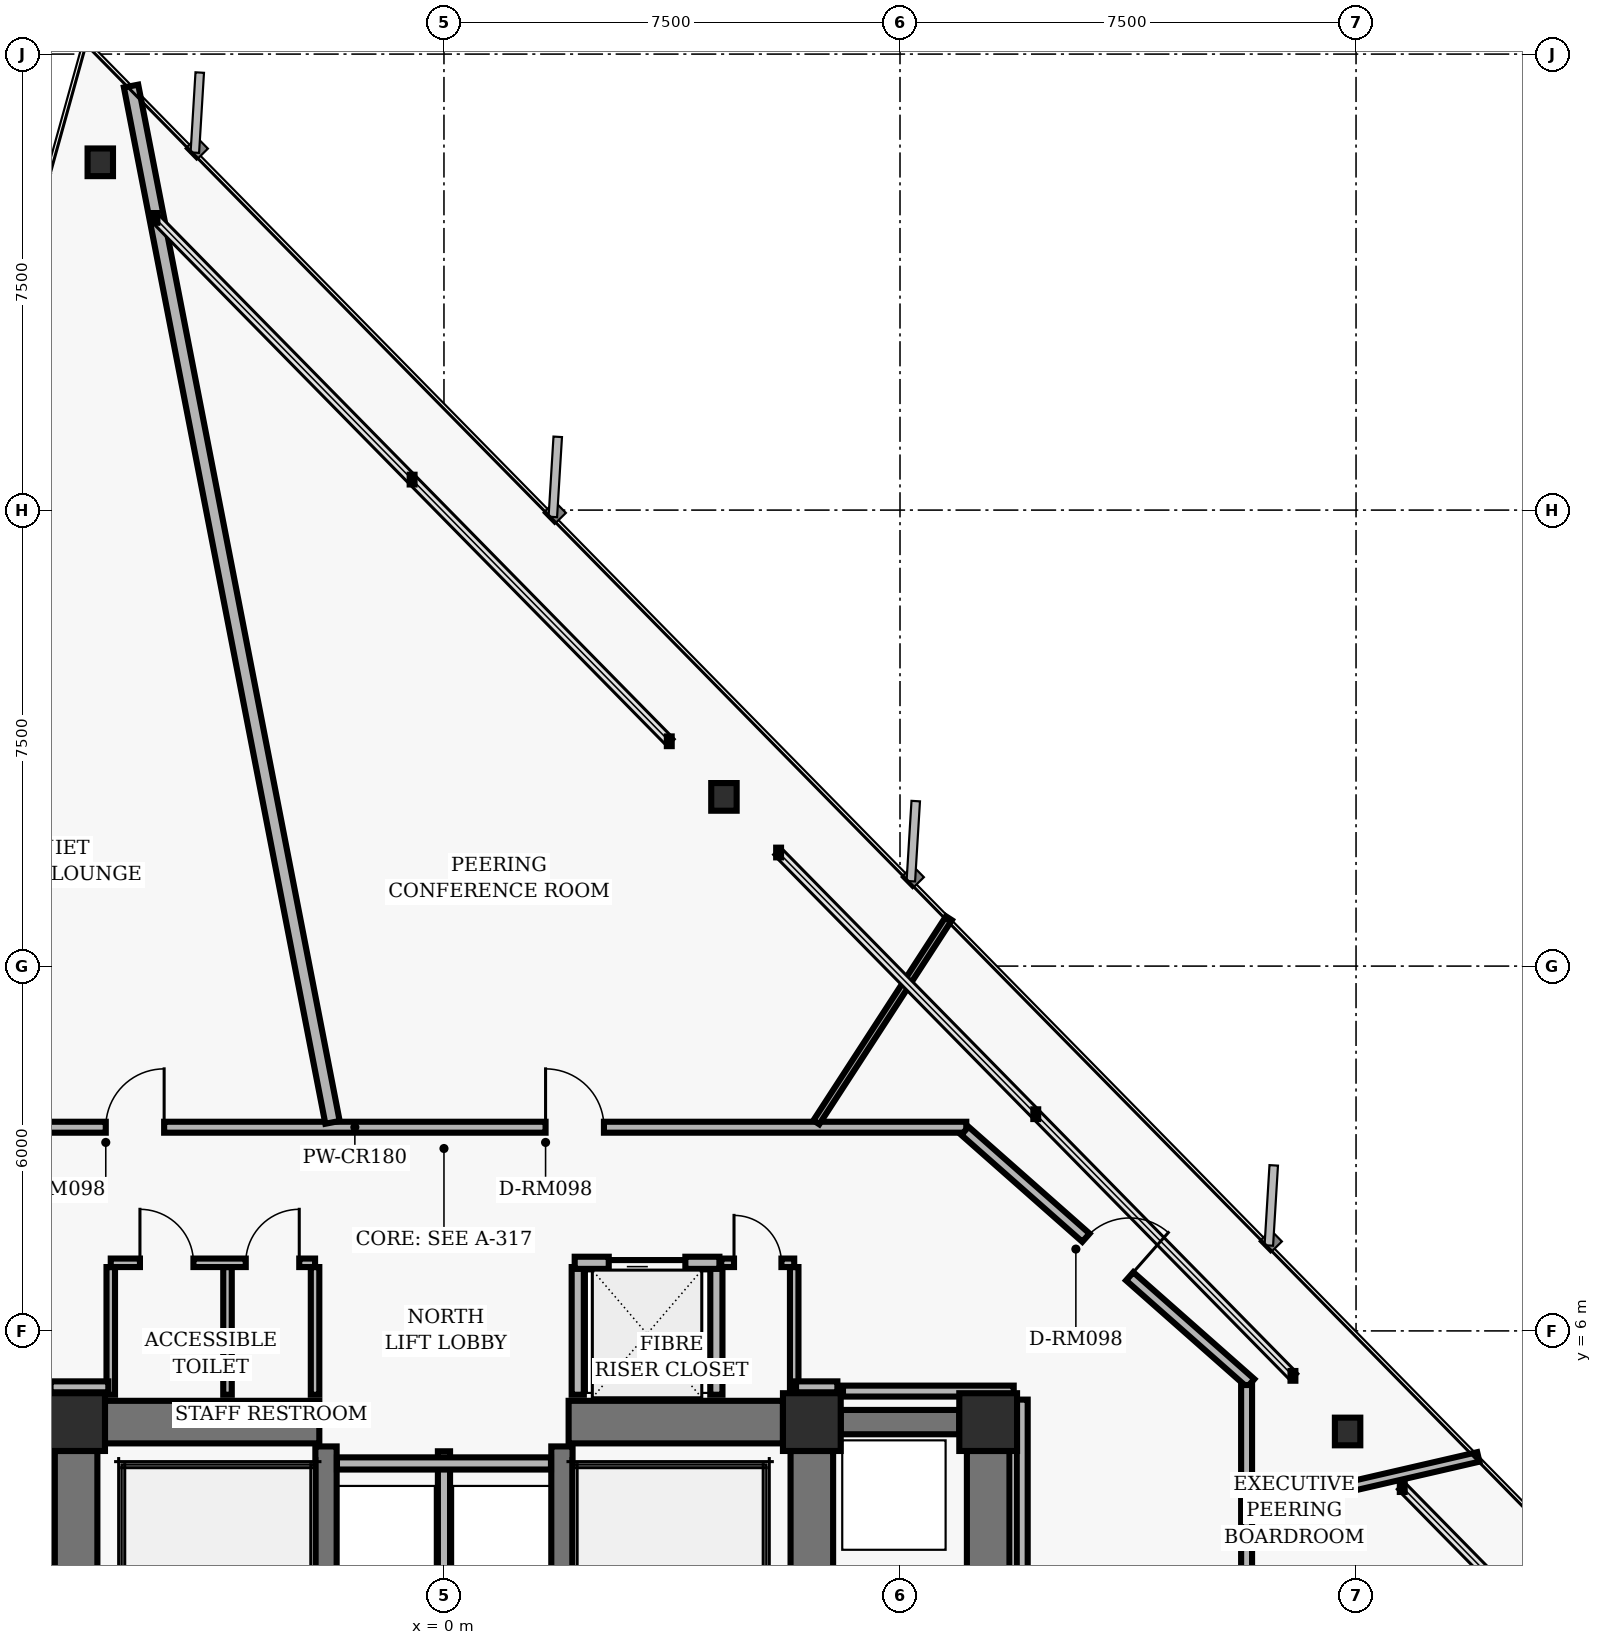
"""IFC4 building model, lengths in metres.
Left out: names, types, materials, properties, quantities, classifications, styles, units other than length and angle.
Written with IfcOpenShell. Run it as: python <this file> out.ifc"""

import sys

from ifc_helpers import new_model, si_unit, direction, frame, frame_2d, origin, origin_2d, place, context, subcontext, project, spatial, rectangle, hollow_rectangle, i_section, extrude, element, fill, save


model = new_model("IFC4")
c1 = context("Model", 3, precision=1e-05, world=origin(), true_north=direction((0.0, 1.0)))
c2 = subcontext(c1, "Body", "Model", "MODEL_VIEW")
j1 = project(units=[si_unit("LENGTHUNIT", "METRE"), si_unit("PLANEANGLEUNIT", "RADIAN")], contexts=[c1])
p1 = place(None, origin())
s1 = spatial("IfcSite", under=j1, at=p1, CompositionType="ELEMENT")
p2 = place(p1, origin())
s2 = spatial("IfcBuilding", under=s1, at=p2, CompositionType="ELEMENT")
p3 = place(p2, frame((0.0, 0.0, 79.52)))
s3 = spatial("IfcBuildingStorey", under=s2, at=p3, CompositionType="ELEMENT", Elevation=79.52)
for number, where, z_axis, x_axis in (
    (1, (-6.05, 4.5, 0.0), (0.0, 0.0, 1.0), (1.0, 0.0, 0.0)),
    (2, (6.05, 4.5, 0.0), (0.0, 0.0, 1.0), (1.0, 0.0, 0.0)),
    (3, (8.95, 4.5, 0.0), (0.0, 0.0, 1.0), (1.0, 0.0, 0.0)),
):
    element("IfcColumn", number, at=place(p3, frame(where, z_axis=z_axis, x_axis=x_axis)), inside=s3, PredefinedType="COLUMN", context=c2, shape_type="SweptSolid", body=[
        extrude(hollow_rectangle(XDim=0.95, YDim=0.95, WallThickness=0.06, InnerFilletRadius=0.02, OuterFilletRadius=0.04, at=origin_2d()), origin(), (0.0, 0.0, 1.0), 3.04),
    ])
for number, where, z_axis, x_axis in (
    (4, (-6.05, 0.475, 0.0), (0.0, 0.0, 1.0), (0.0, 1.0, 0.0)),
    (5, (6.05, 0.475, 0.0), (0.0, 0.0, 1.0), (0.0, 1.0, 0.0)),
):
    element("IfcWall", number, at=place(p3, frame(where, z_axis=z_axis, x_axis=x_axis)), inside=s3, PredefinedType="SHEAR", context=c2, shape_type="SweptSolid", body=[
        extrude(rectangle(XDim=3.55, YDim=0.7, at=frame_2d((1.775, 0.0))), origin(), (0.0, 0.0, 1.0), 2.788),
    ])
for number, where, z_axis, x_axis in (
    (6, (-1.94, -4.1, 0.0), (0.0, 0.0, 1.0), (0.0, 1.0, 0.0)),
    (7, (1.94, -4.1, 0.0), (0.0, 0.0, 1.0), (0.0, 1.0, 0.0)),
):
    element("IfcWall", number, at=place(p3, frame(where, z_axis=z_axis, x_axis=x_axis)), inside=s3, PredefinedType="SHEAR", context=c2, shape_type="SweptSolid", body=[
        extrude(rectangle(XDim=8.2, YDim=0.35, at=frame_2d((4.1, 0.0))), origin(), (0.0, 0.0, 1.0), 2.788),
    ])
for number, where, z_axis, x_axis in (
    (8, (-5.575, 4.5, 0.0), (0.0, 0.0, 1.0), (1.0, 0.0, 0.0)),
    (9, (2.05, 4.5, 0.0), (0.0, 0.0, 1.0), (1.0, 0.0, 0.0)),
):
    element("IfcWall", number, at=place(p3, frame(where, z_axis=z_axis, x_axis=x_axis)), inside=s3, PredefinedType="SHEAR", context=c2, shape_type="SweptSolid", body=[
        extrude(rectangle(XDim=3.525, YDim=0.7, at=frame_2d((1.762, 0.0))), origin(), (0.0, 0.0, 1.0), 2.788),
    ])
p4 = place(p3, frame((8.95, -3.825, 0.0), z_axis=(0.0, 0.0, 1.0), x_axis=(0.0, 1.0, 0.0)))
e10 = element("IfcWall", 10, at=p4, inside=s3, PredefinedType="SHEAR", context=c2, shape_type="SweptSolid", body=[
    extrude(rectangle(XDim=7.85, YDim=0.7, at=frame_2d((3.925, 0.0))), origin(), (0.0, 0.0, 1.0), 2.788),
])
p5 = place(p3, frame((6.525, 4.5, 0.0), z_axis=(0.0, 0.0, 1.0), x_axis=(1.0, 0.0, 0.0)))
e11 = element("IfcWall", 11, at=p5, inside=s3, PredefinedType="SHEAR", context=c2, shape_type="SweptSolid", body=[
    extrude(rectangle(XDim=1.95, YDim=0.4, at=frame_2d((0.975, 0.0))), origin(), (0.0, 0.0, 1.0), 2.788),
])
for number, where, z_axis, x_axis in (
    (12, (14.861, 4.346, 0.0), (0.0, 0.0, 1.0), (1.0, 0.0, 0.0)),
    (13, (4.604, 14.783, 0.0), (0.0, 0.0, 1.0), (1.0, 0.0, 0.0)),
    (14, (-5.652, 25.22, 0.0), (0.0, 0.0, 1.0), (1.0, 0.0, 0.0)),
):
    element("IfcColumn", number, at=place(p3, frame(where, z_axis=z_axis, x_axis=x_axis)), inside=s3, PredefinedType="COLUMN", context=c2, shape_type="SweptSolid", body=[
        extrude(i_section(OverallWidth=0.418, OverallDepth=0.455, WebThickness=0.042, FlangeThickness=0.068, FilletRadius=0.025, at=origin_2d()), origin(), (0.0, 0.0, 1.0), 3.04),
    ])
p6 = place(p3, frame((0.0, 1.25, 0.0), z_axis=(0.0, 0.0, 1.0), x_axis=(0.0, 1.0, 0.0)))
e15 = element("IfcWall", 15, at=p6, inside=s3, PredefinedType="PARTITIONING", context=c2, shape_type="SweptSolid", body=[
    extrude(rectangle(XDim=2.77, YDim=0.2, at=frame_2d((1.385, 0.0))), origin(), (0.0, 0.0, 1.0), 2.763),
])
p7 = place(p3, frame((-1.76, 3.82, 0.0), z_axis=(0.0, 0.0, 1.0), x_axis=(1.0, 0.0, 0.0)))
e16 = element("IfcWall", 16, at=p7, inside=s3, PredefinedType="PARTITIONING", context=c2, shape_type="SweptSolid", body=[
    extrude(rectangle(XDim=3.52, YDim=0.2, at=frame_2d((1.76, 0.0))), origin(), (0.0, 0.0, 1.0), 2.763),
])
for number, where, z_axis, x_axis in (
    (17, (2.2, 4.95, 0.0), (0.0, 0.0, 1.0), (0.0, 1.0, 0.0)),
    (18, (4.48, 4.95, 0.0), (0.0, 0.0, 1.0), (0.0, 1.0, 0.0)),
):
    element("IfcWall", number, at=place(p3, frame(where, z_axis=z_axis, x_axis=x_axis)), inside=s3, PredefinedType="PARTITIONING", context=c2, shape_type="SweptSolid", body=[
        extrude(rectangle(XDim=2.1, YDim=0.2, at=frame_2d((1.05, 0.0))), origin(), (0.0, 0.0, 1.0), 2.763),
    ])
p8 = place(p3, frame((2.15, 7.12, 0.0), z_axis=(0.0, 0.0, 1.0), x_axis=(1.0, 0.0, 0.0)))
e19 = element("IfcWall", 19, at=p8, inside=s3, PredefinedType="PARTITIONING", context=c2, shape_type="SweptSolid", body=[
    extrude(rectangle(XDim=2.38, YDim=0.2, at=frame_2d((1.19, 0.0))), origin(), (0.0, 0.0, 1.0), 2.763),
])
p9 = place(p8, frame((0.56, 0.0, 0.0)))
e20 = element("IfcOpeningElement", 20, at=p9, cuts=e19, PredefinedType="OPENING", context=c2, shape_type="SweptSolid", body=[
    extrude(rectangle(XDim=1.26, YDim=2.06, at=frame_2d((0.63, 1.03))), frame((0.0, 0.11, 0.0), z_axis=(0.0, -1.0, 0.0), x_axis=(1.0, 0.0, 0.0)), (0.0, 0.0, 1.0), 0.22),
])
for number, where, z_axis, x_axis in (
    (21, (-5.48, 4.95, 0.0), (0.0, 0.0, 1.0), (0.0, 1.0, 0.0)),
    (22, (-3.56, 4.95, 0.0), (0.0, 0.0, 1.0), (0.0, 1.0, 0.0)),
    (23, (-2.12, 4.95, 0.0), (0.0, 0.0, 1.0), (0.0, 1.0, 0.0)),
):
    element("IfcWall", number, at=place(p3, frame(where, z_axis=z_axis, x_axis=x_axis)), inside=s3, PredefinedType="PARTITIONING", context=c2, shape_type="SweptSolid", body=[
        extrude(rectangle(XDim=2.1, YDim=0.14, at=frame_2d((1.05, 0.0))), origin(), (0.0, 0.0, 1.0), 2.763),
    ])
p10 = place(p3, frame((-5.48, 7.12, 0.0), z_axis=(0.0, 0.0, 1.0), x_axis=(1.0, 0.0, 0.0)))
e24 = element("IfcWall", 24, at=p10, inside=s3, PredefinedType="PARTITIONING", context=c2, shape_type="SweptSolid", body=[
    extrude(rectangle(XDim=3.36, YDim=0.14, at=frame_2d((1.68, 0.0))), origin(), (0.0, 0.0, 1.0), 2.763),
])
p11 = place(p10, frame((0.48, 0.0, 0.0)))
e25 = element("IfcOpeningElement", 25, at=p11, cuts=e24, PredefinedType="OPENING", context=c2, shape_type="SweptSolid", body=[
    extrude(rectangle(XDim=0.88, YDim=2.02, at=frame_2d((0.44, 1.01))), frame((0.0, 0.08, 0.0), z_axis=(0.0, -1.0, 0.0), x_axis=(1.0, 0.0, 0.0)), (0.0, 0.0, 1.0), 0.16),
])
p12 = place(p10, frame((2.22, 0.0, 0.0)))
e26 = element("IfcOpeningElement", 26, at=p12, cuts=e24, PredefinedType="OPENING", context=c2, shape_type="SweptSolid", body=[
    extrude(rectangle(XDim=0.88, YDim=2.02, at=frame_2d((0.44, 1.01))), frame((0.0, 0.08, 0.0), z_axis=(0.0, -1.0, 0.0), x_axis=(1.0, 0.0, 0.0)), (0.0, 0.0, 1.0), 0.16),
])
p13 = place(p3, frame((5.76, 4.95, 0.0), z_axis=(0.0, 0.0, 1.0), x_axis=(0.0, 1.0, 0.0)))
e27 = element("IfcWall", 27, at=p13, inside=s3, PredefinedType="PARTITIONING", context=c2, shape_type="SweptSolid", body=[
    extrude(rectangle(XDim=2.1, YDim=0.14, at=frame_2d((1.05, 0.0))), origin(), (0.0, 0.0, 1.0), 2.763),
])
p14 = place(p3, frame((4.56, 7.12, 0.0), z_axis=(0.0, 0.0, 1.0), x_axis=(1.0, 0.0, 0.0)))
e28 = element("IfcWall", 28, at=p14, inside=s3, PredefinedType="PARTITIONING", context=c2, shape_type="SweptSolid", body=[
    extrude(rectangle(XDim=1.2, YDim=0.14, at=frame_2d((0.6, 0.0))), origin(), (0.0, 0.0, 1.0), 2.763),
])
p15 = place(p14, frame((0.21, 0.0, 0.0)))
e29 = element("IfcOpeningElement", 29, at=p15, cuts=e28, PredefinedType="OPENING", context=c2, shape_type="SweptSolid", body=[
    extrude(rectangle(XDim=0.78, YDim=2.01, at=frame_2d((0.39, 1.005))), frame((0.0, 0.08, 0.0), z_axis=(0.0, -1.0, 0.0), x_axis=(1.0, 0.0, 0.0)), (0.0, 0.0, 1.0), 0.16),
])
p16 = place(p3, frame((-8.59, 9.35, 0.0), z_axis=(0.0, 0.0, 1.0), x_axis=(1.0, 0.0, 0.0)))
e30 = element("IfcWall", 30, at=p16, inside=s3, PredefinedType="PARTITIONING", context=c2, shape_type="SweptSolid", body=[
    extrude(rectangle(XDim=17.18, YDim=0.18, at=frame_2d((8.59, 0.0))), origin(), (0.0, 0.0, 1.0), 2.277),
])
p17 = place(p16, frame((10.261, 0.0, 0.0)))
e31 = element("IfcOpeningElement", 31, at=p17, cuts=e30, PredefinedType="OPENING", context=c2, shape_type="SweptSolid", body=[
    extrude(rectangle(XDim=0.96, YDim=2.02, at=frame_2d((0.48, 1.01))), frame((0.0, 0.1, 0.0), z_axis=(0.0, -1.0, 0.0), x_axis=(1.0, 0.0, 0.0)), (0.0, 0.0, 1.0), 0.2),
])
p18 = place(p16, frame((3.028, 0.0, 0.0)))
e32 = element("IfcOpeningElement", 32, at=p18, cuts=e30, PredefinedType="OPENING", context=c2, shape_type="SweptSolid", body=[
    extrude(rectangle(XDim=0.96, YDim=2.02, at=frame_2d((0.48, 1.01))), frame((0.0, 0.1, 0.0), z_axis=(0.0, -1.0, 0.0), x_axis=(1.0, 0.0, 0.0)), (0.0, 0.0, 1.0), 0.2),
])
p19 = place(p3, frame((8.567, 9.29, 0.0), z_axis=(0.0, 0.0, 1.0), x_axis=(0.749626463267, -0.66186113768, 0.0)))
e33 = element("IfcWall", 33, at=p19, inside=s3, PredefinedType="PARTITIONING", context=c2, shape_type="SweptSolid", body=[
    extrude(rectangle(XDim=6.27, YDim=0.18, at=frame_2d((3.135, 0.0))), origin(), (0.0, 0.0, 1.0), 2.277),
])
p20 = place(p19, frame((2.655, 0.0, 0.0)))
e34 = element("IfcOpeningElement", 34, at=p20, cuts=e33, PredefinedType="OPENING", context=c2, shape_type="SweptSolid", body=[
    extrude(rectangle(XDim=0.96, YDim=2.02, at=frame_2d((0.48, 1.01))), frame((0.0, 0.1, 0.0), z_axis=(0.0, -1.0, 0.0), x_axis=(1.0, 0.0, 0.0)), (0.0, 0.0, 1.0), 0.2),
])
p21 = place(p3, frame((13.2, 5.11, 0.0), z_axis=(0.0, 0.0, 1.0), x_axis=(0.0, -1.0, 0.0)))
e35 = element("IfcWall", 35, at=p21, inside=s3, PredefinedType="PARTITIONING", context=c2, shape_type="SweptSolid", body=[
    extrude(rectangle(XDim=10.22, YDim=0.18, at=frame_2d((5.11, 0.0))), origin(), (0.0, 0.0, 1.0), 2.277),
])
p22 = place(p21, frame((5.493, 0.0, 0.0)))
e36 = element("IfcOpeningElement", 36, at=p22, cuts=e35, PredefinedType="OPENING", context=c2, shape_type="SweptSolid", body=[
    extrude(rectangle(XDim=1.02, YDim=2.02, at=frame_2d((0.51, 1.01))), frame((0.0, 0.1, 0.0), z_axis=(0.0, -1.0, 0.0), x_axis=(1.0, 0.0, 0.0)), (0.0, 0.0, 1.0), 0.2),
])
p23 = place(p3, frame((9.51, -4.87, 0.0), z_axis=(0.0, 0.0, 1.0), x_axis=(0.0, 1.0, 0.0)))
e37 = element("IfcWall", 37, at=p23, inside=s3, PredefinedType="PARTITIONING", context=c2, shape_type="SweptSolid", body=[
    extrude(rectangle(XDim=9.74, YDim=0.18, at=frame_2d((4.87, 0.0))), origin(), (0.0, 0.0, 1.0), 2.048),
])
p24 = place(p3, frame((9.37, 5.01, 0.0), z_axis=(0.0, 0.0, 1.0), x_axis=(-1.0, 0.0, 0.0)))
e38 = element("IfcWall", 38, at=p24, inside=s3, PredefinedType="PARTITIONING", context=c2, shape_type="SweptSolid", body=[
    extrude(rectangle(XDim=2.808, YDim=0.18, at=frame_2d((1.404, 0.0))), origin(), (0.0, 0.0, 1.0), 2.763),
])
p25 = place(p3, frame((6.47, 5.08, 0.0), z_axis=(0.0, 0.0, 1.0), x_axis=(-1.0, 0.0, 0.0)))
e39 = element("IfcWall", 39, at=p25, inside=s3, PredefinedType="PARTITIONING", context=c2, shape_type="SweptSolid", body=[
    extrude(rectangle(XDim=0.68, YDim=0.18, at=frame_2d((0.34, 0.0))), origin(), (0.0, 0.0, 1.0), 2.763),
])
p26 = place(p3, frame((-5.52, 5.08, 0.0), z_axis=(0.0, 0.0, 1.0), x_axis=(-1.0, 0.0, 0.0)))
e40 = element("IfcWall", 40, at=p26, inside=s3, PredefinedType="PARTITIONING", context=c2, shape_type="SweptSolid", body=[
    extrude(rectangle(XDim=0.95, YDim=0.18, at=frame_2d((0.475, 0.0))), origin(), (0.0, 0.0, 1.0), 2.763),
])
p27 = place(p3, frame((13.28, 3.066, 0.0), z_axis=(0.0, 0.0, 1.0), x_axis=(0.974371849336, 0.224943324464, 0.0)))
e41 = element("IfcWall", 41, at=p27, inside=s3, PredefinedType="PARTITIONING", context=c2, shape_type="SweptSolid", body=[
    extrude(rectangle(XDim=3.829, YDim=0.16, at=frame_2d((1.915, 0.0))), origin(), (0.0, 0.0, 1.0), 2.763),
])
p28 = place(p3, frame((6.124, 9.43, 0.0), z_axis=(0.0, 0.0, 1.0), x_axis=(0.544653909872, 0.838660907912, 0.0)))
e42 = element("IfcWall", 42, at=p28, inside=s3, PredefinedType="MOVABLE", context=c2, shape_type="SweptSolid", body=[
    extrude(rectangle(XDim=4.003, YDim=0.115, at=frame_2d((2.002, 0.0))), origin(), (0.0, 0.0, 1.0), 2.763),
])
p29 = place(p3, frame((-1.833, 9.43, 0.0), z_axis=(0.0, 0.0, 1.0), x_axis=(-0.190802669454, 0.981628413061, 0.0)))
e43 = element("IfcWall", 43, at=p29, inside=s3, PredefinedType="PARTITIONING", context=c2, shape_type="SweptSolid", body=[
    extrude(rectangle(XDim=17.364, YDim=0.24, at=frame_2d((8.682, 0.0))), origin(), (0.0, 0.0, 1.0), 2.763),
])
p30 = place(p9, origin())
e44 = element("IfcDoor", 44, at=p30, inside=s3, OperationType="SLIDING_TO_LEFT", PredefinedType="DOOR", context=c2, shape_type="SweptSolid", body=[
    extrude(rectangle(XDim=1.26, YDim=2.06, at=frame_2d((0.63, 1.03))), frame((0.0, 0.025, 0.0), z_axis=(0.0, -1.0, 0.0), x_axis=(1.0, 0.0, 0.0)), (0.0, 0.0, 1.0), 0.05),
])
fill(e20, e44)
p31 = place(p11, origin())
e45 = element("IfcDoor", 45, at=p31, inside=s3, OperationType="SINGLE_SWING_LEFT", PredefinedType="DOOR", context=c2, shape_type="SweptSolid", body=[
    extrude(rectangle(XDim=0.88, YDim=2.02, at=frame_2d((0.44, 1.01))), frame((0.0, 0.025, 0.0), z_axis=(0.0, -1.0, 0.0), x_axis=(1.0, 0.0, 0.0)), (0.0, 0.0, 1.0), 0.05),
])
fill(e25, e45)
p32 = place(p12, origin())
e46 = element("IfcDoor", 46, at=p32, inside=s3, OperationType="SINGLE_SWING_RIGHT", PredefinedType="DOOR", context=c2, shape_type="SweptSolid", body=[
    extrude(rectangle(XDim=0.88, YDim=2.02, at=frame_2d((0.44, 1.01))), frame((0.0, 0.025, 0.0), z_axis=(0.0, -1.0, 0.0), x_axis=(1.0, 0.0, 0.0)), (0.0, 0.0, 1.0), 0.05),
])
fill(e26, e46)
p33 = place(p15, origin())
e47 = element("IfcDoor", 47, at=p33, inside=s3, OperationType="SINGLE_SWING_LEFT", PredefinedType="DOOR", context=c2, shape_type="SweptSolid", body=[
    extrude(rectangle(XDim=0.78, YDim=2.01, at=frame_2d((0.39, 1.005))), frame((0.0, 0.025, 0.0), z_axis=(0.0, -1.0, 0.0), x_axis=(1.0, 0.0, 0.0)), (0.0, 0.0, 1.0), 0.05),
])
fill(e29, e47)
p34 = place(p20, origin())
e48 = element("IfcDoor", 48, at=p34, inside=s3, OperationType="SINGLE_SWING_RIGHT", PredefinedType="DOOR", context=c2, shape_type="SweptSolid", body=[
    extrude(rectangle(XDim=0.96, YDim=2.02, at=frame_2d((0.48, 1.01))), frame((0.0, 0.025, 0.0), z_axis=(0.0, -1.0, 0.0), x_axis=(1.0, 0.0, 0.0)), (0.0, 0.0, 1.0), 0.05),
])
fill(e34, e48)
p35 = place(p17, origin())
e49 = element("IfcDoor", 49, at=p35, inside=s3, OperationType="SINGLE_SWING_LEFT", PredefinedType="DOOR", context=c2, shape_type="SweptSolid", body=[
    extrude(rectangle(XDim=0.96, YDim=2.02, at=frame_2d((0.48, 1.01))), frame((0.0, 0.025, 0.0), z_axis=(0.0, -1.0, 0.0), x_axis=(1.0, 0.0, 0.0)), (0.0, 0.0, 1.0), 0.05),
])
fill(e31, e49)
p36 = place(p18, origin())
e50 = element("IfcDoor", 50, at=p36, inside=s3, OperationType="SINGLE_SWING_RIGHT", PredefinedType="DOOR", context=c2, shape_type="SweptSolid", body=[
    extrude(rectangle(XDim=0.96, YDim=2.02, at=frame_2d((0.48, 1.01))), frame((0.0, 0.025, 0.0), z_axis=(0.0, -1.0, 0.0), x_axis=(1.0, 0.0, 0.0)), (0.0, 0.0, 1.0), 0.05),
])
fill(e32, e50)
save(model, sys.argv[1])
